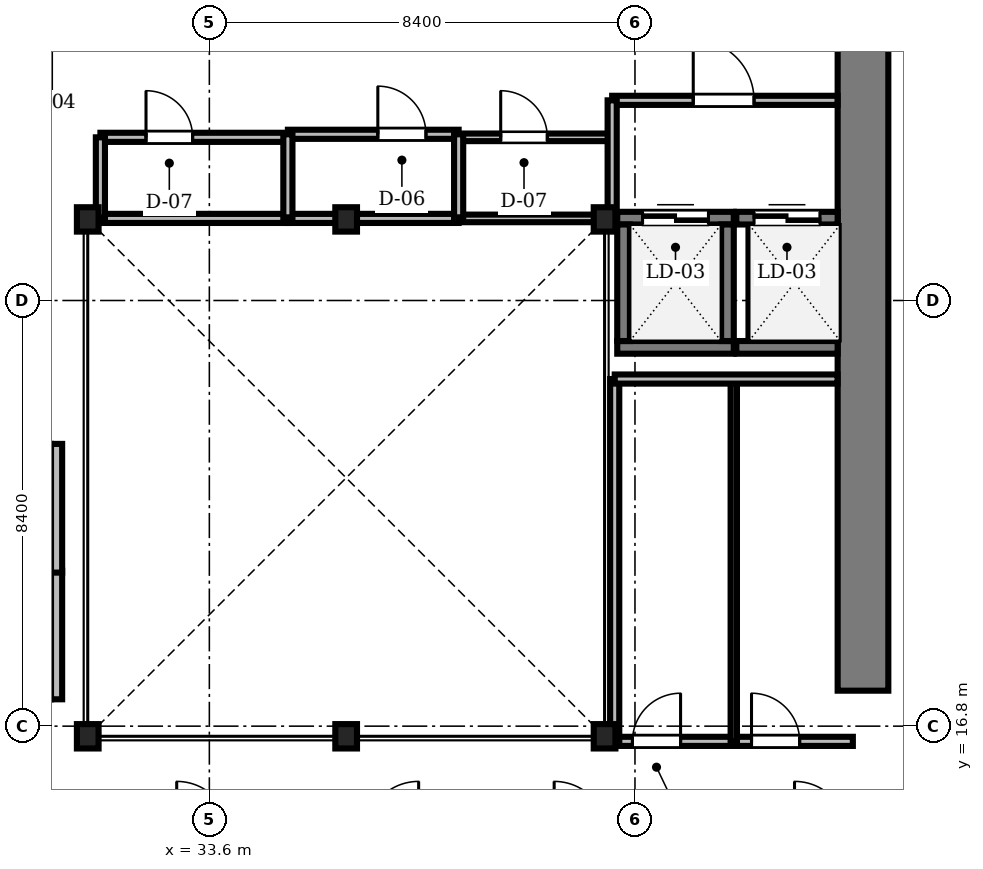
"""IFC4 building model, lengths in metres.
Left out: names, types, materials, properties, quantities, classifications, styles, units other than length and angle.
Written with IfcOpenShell. Run it as: python <this file> out.ifc"""

import sys

from ifc_helpers import new_model, si_unit, direction, frame, frame_2d, origin, origin_2d, place, context, subcontext, project, spatial, rectangle, i_section, extrude, source, transform, mapped, element, fill, save


model = new_model("IFC4")
c1 = context("Model", 3, precision=1e-05, world=origin(), true_north=direction((0.0, 1.0)))
c2 = subcontext(c1, "Body", "Model", "MODEL_VIEW")
j1 = project(units=[si_unit("LENGTHUNIT", "METRE"), si_unit("PLANEANGLEUNIT", "RADIAN")], contexts=[c1])
p1 = place(None, origin())
s1 = spatial("IfcSite", under=j1, at=p1, CompositionType="ELEMENT")
p2 = place(p1, origin())
s2 = spatial("IfcBuilding", under=s1, at=p2, CompositionType="ELEMENT")
p3 = place(p2, frame((0.0, 0.0, 89.65)))
s3 = spatial("IfcBuildingStorey", under=s2, at=p3, CompositionType="ELEMENT", Elevation=89.65)
m1 = source(origin(), c2, "Body", "SweptSolid", [
    extrude(rectangle(XDim=13.15, YDim=1.0, at=frame_2d((6.575, 0.0))), origin(), (0.0, 0.0, 1.0), 3.0),
])
p4 = place(p3, frame((46.5, 17.5, 0.0), z_axis=(0.0, 0.0, 1.0), x_axis=(0.0, 1.0, 0.0)))
e1 = element("IfcWall", 1, at=p4, inside=s3, PredefinedType="SHEAR", context=c2, shape_type="MappedRepresentation", body=[
    mapped(m1, transform((0.0, 0.0, 0.0), scale=1.0)),
])
m2 = source(origin(), c2, "Body", "SweptSolid", [
    extrude(i_section(OverallWidth=0.428, OverallDepth=0.481, WebThickness=0.04, FlangeThickness=0.063, FilletRadius=0.015, at=origin_2d()), origin(), (0.0, 0.0, 1.0), 3.0),
])
for number, where, z_axis, x_axis in (
    (2, (31.2, 16.6, 0.0), (0.0, 0.0, 1.0), (1.0, 0.0, 0.0)),
    (3, (36.3, 16.6, 0.0), (0.0, 0.0, 1.0), (1.0, 0.0, 0.0)),
    (4, (41.4, 16.6, 0.0), (0.0, 0.0, 1.0), (1.0, 0.0, 0.0)),
    (5, (41.4, 26.8, 0.0), (0.0, 0.0, 1.0), (1.0, 0.0, 0.0)),
    (6, (36.3, 26.8, 0.0), (0.0, 0.0, 1.0), (1.0, 0.0, 0.0)),
    (7, (31.2, 26.8, 0.0), (0.0, 0.0, 1.0), (1.0, 0.0, 0.0)),
):
    element("IfcColumn", number, at=place(p3, frame(where, z_axis=z_axis, x_axis=x_axis)), inside=s3, PredefinedType="COLUMN", context=c2, shape_type="MappedRepresentation", body=[
        mapped(m2, transform((0.0, 0.0, 0.0), scale=1.0)),
    ])
m3 = source(origin(), c2, "Body", "SweptSolid", [
    extrude(rectangle(XDim=2.54, YDim=0.22, at=frame_2d((1.27, 0.0))), origin(), (0.0, 0.0, 1.0), 3.0),
])
for number, where, z_axis, x_axis in (
    (8, (30.585, 17.33, 0.0), (0.0, 0.0, 1.0), (0.0, 1.0, 0.0)),
    (9, (30.585, 19.83, 0.0), (0.0, 0.0, 1.0), (0.0, 1.0, 0.0)),
):
    element("IfcWall", number, at=place(p3, frame(where, z_axis=z_axis, x_axis=x_axis)), inside=s3, PredefinedType="SOLIDWALL", context=c2, shape_type="MappedRepresentation", body=[
        mapped(m3, transform((0.0, 0.0, 0.0), scale=1.0)),
    ])
m4 = source(origin(), c2, "Body", "SweptSolid", [
    extrude(rectangle(XDim=2.3, YDim=0.25, at=frame_2d((1.15, 0.0))), origin(), (0.0, 0.0, 1.0), 3.0),
])
p5 = place(p3, frame((41.65, 24.275, 0.0), z_axis=(0.0, 0.0, 1.0), x_axis=(1.0, 0.0, 0.0)))
e10 = element("IfcWall", 10, at=p5, inside=s3, PredefinedType="SOLIDWALL", context=c2, shape_type="MappedRepresentation", body=[
    mapped(m4, transform((0.0, 0.0, 0.0), scale=1.0)),
])
p6 = place(p3, frame((41.65, 26.825, 0.0), z_axis=(0.0, 0.0, 1.0), x_axis=(1.0, 0.0, 0.0)))
e11 = element("IfcWall", 11, at=p6, inside=s3, PredefinedType="SOLIDWALL", context=c2, shape_type="MappedRepresentation", body=[
    mapped(m4, transform((0.0, 0.0, 0.0), scale=1.0)),
])
m5 = source(origin(), c2, "Body", "SweptSolid", [
    extrude(rectangle(XDim=1.3, YDim=2.3, at=frame_2d((0.65, 1.15))), frame((0.0, 0.135, 0.0), z_axis=(0.0, -1.0, 0.0), x_axis=(1.0, 0.0, 0.0)), (0.0, 0.0, 1.0), 0.27),
])
p7 = place(p6, frame((0.5, 0.0, 0.0)))
e12 = element("IfcOpeningElement", 12, at=p7, cuts=e11, PredefinedType="OPENING", context=c2, shape_type="MappedRepresentation", body=[
    mapped(m5, transform((0.0, 0.0, 0.0), scale=1.0)),
])
for number, where, z_axis, x_axis in (
    (13, (41.775, 24.4, 0.0), (0.0, 0.0, 1.0), (0.0, 1.0, 0.0)),
    (14, (43.825, 24.4, 0.0), (0.0, 0.0, 1.0), (0.0, 1.0, 0.0)),
):
    element("IfcWall", number, at=place(p3, frame(where, z_axis=z_axis, x_axis=x_axis)), inside=s3, PredefinedType="SOLIDWALL", context=c2, shape_type="MappedRepresentation", body=[
        mapped(m4, transform((0.0, 0.0, 0.0), scale=1.0)),
    ])
m6 = source(origin(), c2, "Body", "SweptSolid", [
    extrude(rectangle(XDim=2.0, YDim=0.25, at=frame_2d((1.0, 0.0))), origin(), (0.0, 0.0, 1.0), 3.0),
])
p8 = place(p3, frame((44.0, 24.275, 0.0), z_axis=(0.0, 0.0, 1.0), x_axis=(1.0, 0.0, 0.0)))
e15 = element("IfcWall", 15, at=p8, inside=s3, PredefinedType="SOLIDWALL", context=c2, shape_type="MappedRepresentation", body=[
    mapped(m6, transform((0.0, 0.0, 0.0), scale=1.0)),
])
p9 = place(p3, frame((44.0, 26.825, 0.0), z_axis=(0.0, 0.0, 1.0), x_axis=(1.0, 0.0, 0.0)))
e16 = element("IfcWall", 16, at=p9, inside=s3, PredefinedType="SOLIDWALL", context=c2, shape_type="MappedRepresentation", body=[
    mapped(m6, transform((0.0, 0.0, 0.0), scale=1.0)),
])
p10 = place(p9, frame((0.35, 0.0, 0.0)))
e17 = element("IfcOpeningElement", 17, at=p10, cuts=e16, PredefinedType="OPENING", context=c2, shape_type="MappedRepresentation", body=[
    mapped(m5, transform((0.0, 0.0, 0.0), scale=1.0)),
])
m7 = source(origin(), c2, "Body", "SweptSolid", [
    extrude(rectangle(XDim=4.448, YDim=0.18, at=frame_2d((2.224, 0.0))), origin(), (0.0, 0.0, 1.0), 2.632),
])
p11 = place(p3, frame((41.55, 29.15, 0.0), z_axis=(0.0, 0.0, 1.0), x_axis=(1.0, 0.0, 0.0)))
e18 = element("IfcWall", 18, at=p11, inside=s3, PredefinedType="PARTITIONING", context=c2, shape_type="MappedRepresentation", body=[
    mapped(m7, transform((0.0, 0.0, 0.0), scale=1.0)),
])
m8 = source(origin(), c2, "Body", "SweptSolid", [
    extrude(rectangle(XDim=1.2, YDim=2.2, at=frame_2d((0.6, 1.1))), frame((0.0, 0.1, 0.0), z_axis=(0.0, -1.0, 0.0), x_axis=(1.0, 0.0, 0.0)), (0.0, 0.0, 1.0), 0.2),
])
p12 = place(p11, frame((1.6, 0.0, 0.0)))
e19 = element("IfcOpeningElement", 19, at=p12, cuts=e18, PredefinedType="OPENING", context=c2, shape_type="MappedRepresentation", body=[
    mapped(m8, transform((0.0, 0.0, 0.0), scale=1.0)),
])
m9 = source(origin(), c2, "Body", "SweptSolid", [
    extrude(rectangle(XDim=4.7, YDim=0.18, at=frame_2d((2.35, 0.0))), origin(), (0.0, 0.0, 1.0), 2.442),
])
p13 = place(p3, frame((41.6, 16.5, 0.0), z_axis=(0.0, 0.0, 1.0), x_axis=(1.0, 0.0, 0.0)))
e20 = element("IfcWall", 20, at=p13, inside=s3, PredefinedType="PARTITIONING", context=c2, shape_type="MappedRepresentation", body=[
    mapped(m9, transform((0.0, 0.0, 0.0), scale=1.0)),
])
m10 = source(origin(), c2, "Body", "SweptSolid", [
    extrude(rectangle(XDim=0.95, YDim=2.15, at=frame_2d((0.475, 1.075))), frame((0.0, 0.1, 0.0), z_axis=(0.0, -1.0, 0.0), x_axis=(1.0, 0.0, 0.0)), (0.0, 0.0, 1.0), 0.2),
])
p14 = place(p13, frame((0.35, 0.0, 0.0)))
e21 = element("IfcOpeningElement", 21, at=p14, cuts=e20, PredefinedType="OPENING", context=c2, shape_type="MappedRepresentation", body=[
    mapped(m10, transform((0.0, 0.0, 0.0), scale=1.0)),
])
p15 = place(p13, frame((2.7, 0.0, 0.0)))
e22 = element("IfcOpeningElement", 22, at=p15, cuts=e20, PredefinedType="OPENING", context=c2, shape_type="MappedRepresentation", body=[
    mapped(m10, transform((0.0, 0.0, 0.0), scale=1.0)),
])
m11 = source(origin(), c2, "Body", "SweptSolid", [
    extrude(rectangle(XDim=3.7, YDim=0.18, at=frame_2d((1.85, 0.0))), origin(), (0.0, 0.0, 1.0), 2.632),
])
p16 = place(p3, frame((31.45, 28.42, 0.0), z_axis=(0.0, 0.0, 1.0), x_axis=(1.0, 0.0, 0.0)))
e23 = element("IfcWall", 23, at=p16, inside=s3, PredefinedType="PARTITIONING", context=c2, shape_type="MappedRepresentation", body=[
    mapped(m11, transform((0.0, 0.0, 0.0), scale=1.0)),
])
m12 = source(origin(), c2, "Body", "SweptSolid", [
    extrude(rectangle(XDim=0.92, YDim=2.1, at=frame_2d((0.46, 1.05))), frame((0.0, 0.1, 0.0), z_axis=(0.0, -1.0, 0.0), x_axis=(1.0, 0.0, 0.0)), (0.0, 0.0, 1.0), 0.2),
])
p17 = place(p16, frame((0.9, 0.0, 0.0)))
e24 = element("IfcOpeningElement", 24, at=p17, cuts=e23, PredefinedType="OPENING", context=c2, shape_type="MappedRepresentation", body=[
    mapped(m12, transform((0.0, 0.0, 0.0), scale=1.0)),
])
m13 = source(origin(), c2, "Body", "SweptSolid", [
    extrude(rectangle(XDim=3.37, YDim=0.18, at=frame_2d((1.685, 0.0))), origin(), (0.0, 0.0, 1.0), 3.0),
])
p18 = place(p3, frame((35.15, 28.48, 0.0), z_axis=(0.0, 0.0, 1.0), x_axis=(1.0, 0.0, 0.0)))
e25 = element("IfcWall", 25, at=p18, inside=s3, PredefinedType="PARTITIONING", context=c2, shape_type="MappedRepresentation", body=[
    mapped(m13, transform((0.0, 0.0, 0.0), scale=1.0)),
])
p19 = place(p18, frame((1.775, 0.0, 0.0)))
e26 = element("IfcOpeningElement", 26, at=p19, cuts=e25, PredefinedType="OPENING", context=c2, shape_type="MappedRepresentation", body=[
    mapped(m10, transform((0.0, 0.0, 0.0), scale=1.0)),
])
m14 = source(origin(), c2, "Body", "SweptSolid", [
    extrude(rectangle(XDim=3.0, YDim=0.15, at=frame_2d((1.5, 0.0))), origin(), (0.0, 0.0, 1.0), 3.0),
])
p20 = place(p3, frame((38.52, 28.42, 0.0), z_axis=(0.0, 0.0, 1.0), x_axis=(1.0, 0.0, 0.0)))
e27 = element("IfcWall", 27, at=p20, inside=s3, PredefinedType="PARTITIONING", context=c2, shape_type="MappedRepresentation", body=[
    mapped(m14, transform((0.0, 0.0, 0.0), scale=1.0)),
])
m15 = source(origin(), c2, "Body", "SweptSolid", [
    extrude(rectangle(XDim=0.92, YDim=2.1, at=frame_2d((0.46, 1.05))), frame((0.0, 0.085, 0.0), z_axis=(0.0, -1.0, 0.0), x_axis=(1.0, 0.0, 0.0)), (0.0, 0.0, 1.0), 0.17),
])
p21 = place(p20, frame((0.83, 0.0, 0.0)))
e28 = element("IfcOpeningElement", 28, at=p21, cuts=e27, PredefinedType="OPENING", context=c2, shape_type="MappedRepresentation", body=[
    mapped(m15, transform((0.0, 0.0, 0.0), scale=1.0)),
])
m16 = source(origin(), c2, "Body", "SweptSolid", [
    extrude(rectangle(XDim=7.15, YDim=0.18, at=frame_2d((3.575, 0.0))), origin(), (0.0, 0.0, 1.0), 2.442),
])
p22 = place(p3, frame((41.6, 16.5, 0.0), z_axis=(0.0, 0.0, 1.0), x_axis=(0.0, 1.0, 0.0)))
e29 = element("IfcWall", 29, at=p22, inside=s3, PredefinedType="PARTITIONING", context=c2, shape_type="MappedRepresentation", body=[
    mapped(m16, transform((0.0, 0.0, 0.0), scale=1.0)),
])
m17 = source(origin(), c2, "Body", "SweptSolid", [
    extrude(rectangle(XDim=7.15, YDim=0.125, at=frame_2d((3.575, 0.0))), origin(), (0.0, 0.0, 1.0), 2.442),
])
p23 = place(p3, frame((43.95, 16.5, 0.0), z_axis=(0.0, 0.0, 1.0), x_axis=(0.0, 1.0, 0.0)))
e30 = element("IfcWall", 30, at=p23, inside=s3, PredefinedType="PARTITIONING", context=c2, shape_type="MappedRepresentation", body=[
    mapped(m17, transform((0.0, 0.0, 0.0), scale=1.0)),
])
m18 = source(origin(), c2, "Body", "SweptSolid", [
    extrude(rectangle(XDim=4.398, YDim=0.18, at=frame_2d((2.199, 0.0))), origin(), (0.0, 0.0, 1.0), 3.0),
])
p24 = place(p3, frame((41.6, 23.65, 0.0), z_axis=(0.0, 0.0, 1.0), x_axis=(1.0, 0.0, 0.0)))
e31 = element("IfcWall", 31, at=p24, inside=s3, PredefinedType="PARTITIONING", context=c2, shape_type="MappedRepresentation", body=[
    mapped(m18, transform((0.0, 0.0, 0.0), scale=1.0)),
])
m19 = source(origin(), c2, "Body", "SweptSolid", [
    extrude(rectangle(XDim=3.7, YDim=0.18, at=frame_2d((1.85, 0.0))), origin(), (0.0, 0.0, 1.0), 2.542),
])
p25 = place(p3, frame((31.45, 26.82, 0.0), z_axis=(0.0, 0.0, 1.0), x_axis=(1.0, 0.0, 0.0)))
e32 = element("IfcWall", 32, at=p25, inside=s3, PredefinedType="PARTITIONING", context=c2, shape_type="MappedRepresentation", body=[
    mapped(m19, transform((0.0, 0.0, 0.0), scale=1.0)),
])
m20 = source(origin(), c2, "Body", "SweptSolid", [
    extrude(rectangle(XDim=3.37, YDim=0.18, at=frame_2d((1.685, 0.0))), origin(), (0.0, 0.0, 1.0), 2.542),
])
p26 = place(p3, frame((35.15, 26.82, 0.0), z_axis=(0.0, 0.0, 1.0), x_axis=(1.0, 0.0, 0.0)))
e33 = element("IfcWall", 33, at=p26, inside=s3, PredefinedType="PARTITIONING", context=c2, shape_type="MappedRepresentation", body=[
    mapped(m20, transform((0.0, 0.0, 0.0), scale=1.0)),
])
m21 = source(origin(), c2, "Body", "SweptSolid", [
    extrude(rectangle(XDim=3.0, YDim=0.15, at=frame_2d((1.5, 0.0))), origin(), (0.0, 0.0, 1.0), 2.442),
])
p27 = place(p3, frame((38.52, 26.82, 0.0), z_axis=(0.0, 0.0, 1.0), x_axis=(1.0, 0.0, 0.0)))
e34 = element("IfcWall", 34, at=p27, inside=s3, PredefinedType="PARTITIONING", context=c2, shape_type="MappedRepresentation", body=[
    mapped(m21, transform((0.0, 0.0, 0.0), scale=1.0)),
])
m22 = source(origin(), c2, "Body", "SweptSolid", [
    extrude(rectangle(XDim=2.35, YDim=0.18, at=frame_2d((1.175, 0.0))), origin(), (0.0, 0.0, 1.0), 2.442),
])
p28 = place(p3, frame((41.55, 26.8, 0.0), z_axis=(0.0, 0.0, 1.0), x_axis=(0.0, 1.0, 0.0)))
e35 = element("IfcWall", 35, at=p28, inside=s3, PredefinedType="PARTITIONING", context=c2, shape_type="MappedRepresentation", body=[
    mapped(m22, transform((0.0, 0.0, 0.0), scale=1.0)),
])
m23 = source(origin(), c2, "Body", "SweptSolid", [
    extrude(rectangle(XDim=1.66, YDim=0.18, at=frame_2d((0.83, 0.0))), origin(), (0.0, 0.0, 1.0), 2.542),
])
for number, where, z_axis, x_axis in (
    (36, (35.15, 26.82, 0.0), (0.0, 0.0, 1.0), (0.0, 1.0, 0.0)),
    (37, (38.52, 26.82, 0.0), (0.0, 0.0, 1.0), (0.0, 1.0, 0.0)),
):
    element("IfcWall", number, at=place(p3, frame(where, z_axis=z_axis, x_axis=x_axis)), inside=s3, PredefinedType="PARTITIONING", context=c2, shape_type="MappedRepresentation", body=[
        mapped(m23, transform((0.0, 0.0, 0.0), scale=1.0)),
    ])
m24 = source(origin(), c2, "Body", "SweptSolid", [
    extrude(rectangle(XDim=1.6, YDim=0.18, at=frame_2d((0.8, 0.0))), origin(), (0.0, 0.0, 1.0), 2.542),
])
p29 = place(p3, frame((31.45, 26.82, 0.0), z_axis=(0.0, 0.0, 1.0), x_axis=(0.0, 1.0, 0.0)))
e38 = element("IfcWall", 38, at=p29, inside=s3, PredefinedType="PARTITIONING", context=c2, shape_type="MappedRepresentation", body=[
    mapped(m24, transform((0.0, 0.0, 0.0), scale=1.0)),
])
m25 = source(origin(), c2, "Body", "SweptSolid", [
    extrude(rectangle(XDim=1.3, YDim=2.3, at=frame_2d((0.65, 1.15))), frame((0.0, 0.025, 0.0), z_axis=(0.0, -1.0, 0.0), x_axis=(1.0, 0.0, 0.0)), (0.0, 0.0, 1.0), 0.05),
])
p30 = place(p7, origin())
e39 = element("IfcDoor", 39, at=p30, inside=s3, OperationType="DOUBLE_DOOR_SLIDING", PredefinedType="DOOR", context=c2, shape_type="MappedRepresentation", body=[
    mapped(m25, transform((0.0, 0.0, 0.0), scale=1.0)),
])
fill(e12, e39)
p31 = place(p10, origin())
e40 = element("IfcDoor", 40, at=p31, inside=s3, OperationType="DOUBLE_DOOR_SLIDING", PredefinedType="DOOR", context=c2, shape_type="MappedRepresentation", body=[
    mapped(m25, transform((0.0, 0.0, 0.0), scale=1.0)),
])
fill(e17, e40)
m26 = source(origin(), c2, "Body", "SweptSolid", [
    extrude(rectangle(XDim=1.2, YDim=2.2, at=frame_2d((0.6, 1.1))), frame((0.0, 0.025, 0.0), z_axis=(0.0, -1.0, 0.0), x_axis=(1.0, 0.0, 0.0)), (0.0, 0.0, 1.0), 0.05),
])
p32 = place(p12, origin())
e41 = element("IfcDoor", 41, at=p32, inside=s3, OperationType="SINGLE_SWING_LEFT", PredefinedType="DOOR", context=c2, shape_type="MappedRepresentation", body=[
    mapped(m26, transform((0.0, 0.0, 0.0), scale=1.0)),
])
fill(e19, e41)
m27 = source(origin(), c2, "Body", "SweptSolid", [
    extrude(rectangle(XDim=0.95, YDim=2.15, at=frame_2d((0.475, 1.075))), frame((0.0, 0.025, 0.0), z_axis=(0.0, -1.0, 0.0), x_axis=(1.0, 0.0, 0.0)), (0.0, 0.0, 1.0), 0.05),
])
p33 = place(p14, origin())
e42 = element("IfcDoor", 42, at=p33, inside=s3, OperationType="SINGLE_SWING_RIGHT", PredefinedType="DOOR", context=c2, shape_type="MappedRepresentation", body=[
    mapped(m27, transform((0.0, 0.0, 0.0), scale=1.0)),
])
fill(e21, e42)
p34 = place(p15, origin())
e43 = element("IfcDoor", 43, at=p34, inside=s3, OperationType="SINGLE_SWING_LEFT", PredefinedType="DOOR", context=c2, shape_type="MappedRepresentation", body=[
    mapped(m27, transform((0.0, 0.0, 0.0), scale=1.0)),
])
fill(e22, e43)
m28 = source(origin(), c2, "Body", "SweptSolid", [
    extrude(rectangle(XDim=0.92, YDim=2.1, at=frame_2d((0.46, 1.05))), frame((0.0, 0.025, 0.0), z_axis=(0.0, -1.0, 0.0), x_axis=(1.0, 0.0, 0.0)), (0.0, 0.0, 1.0), 0.05),
])
p35 = place(p17, origin())
e44 = element("IfcDoor", 44, at=p35, inside=s3, OperationType="SINGLE_SWING_LEFT", PredefinedType="DOOR", context=c2, shape_type="MappedRepresentation", body=[
    mapped(m28, transform((0.0, 0.0, 0.0), scale=1.0)),
])
fill(e24, e44)
p36 = place(p19, origin())
e45 = element("IfcDoor", 45, at=p36, inside=s3, OperationType="SINGLE_SWING_LEFT", PredefinedType="DOOR", context=c2, shape_type="MappedRepresentation", body=[
    mapped(m27, transform((0.0, 0.0, 0.0), scale=1.0)),
])
fill(e26, e45)
p37 = place(p21, origin())
e46 = element("IfcDoor", 46, at=p37, inside=s3, OperationType="SINGLE_SWING_LEFT", PredefinedType="DOOR", context=c2, shape_type="MappedRepresentation", body=[
    mapped(m28, transform((0.0, 0.0, 0.0), scale=1.0)),
])
fill(e28, e46)
save(model, sys.argv[1])
